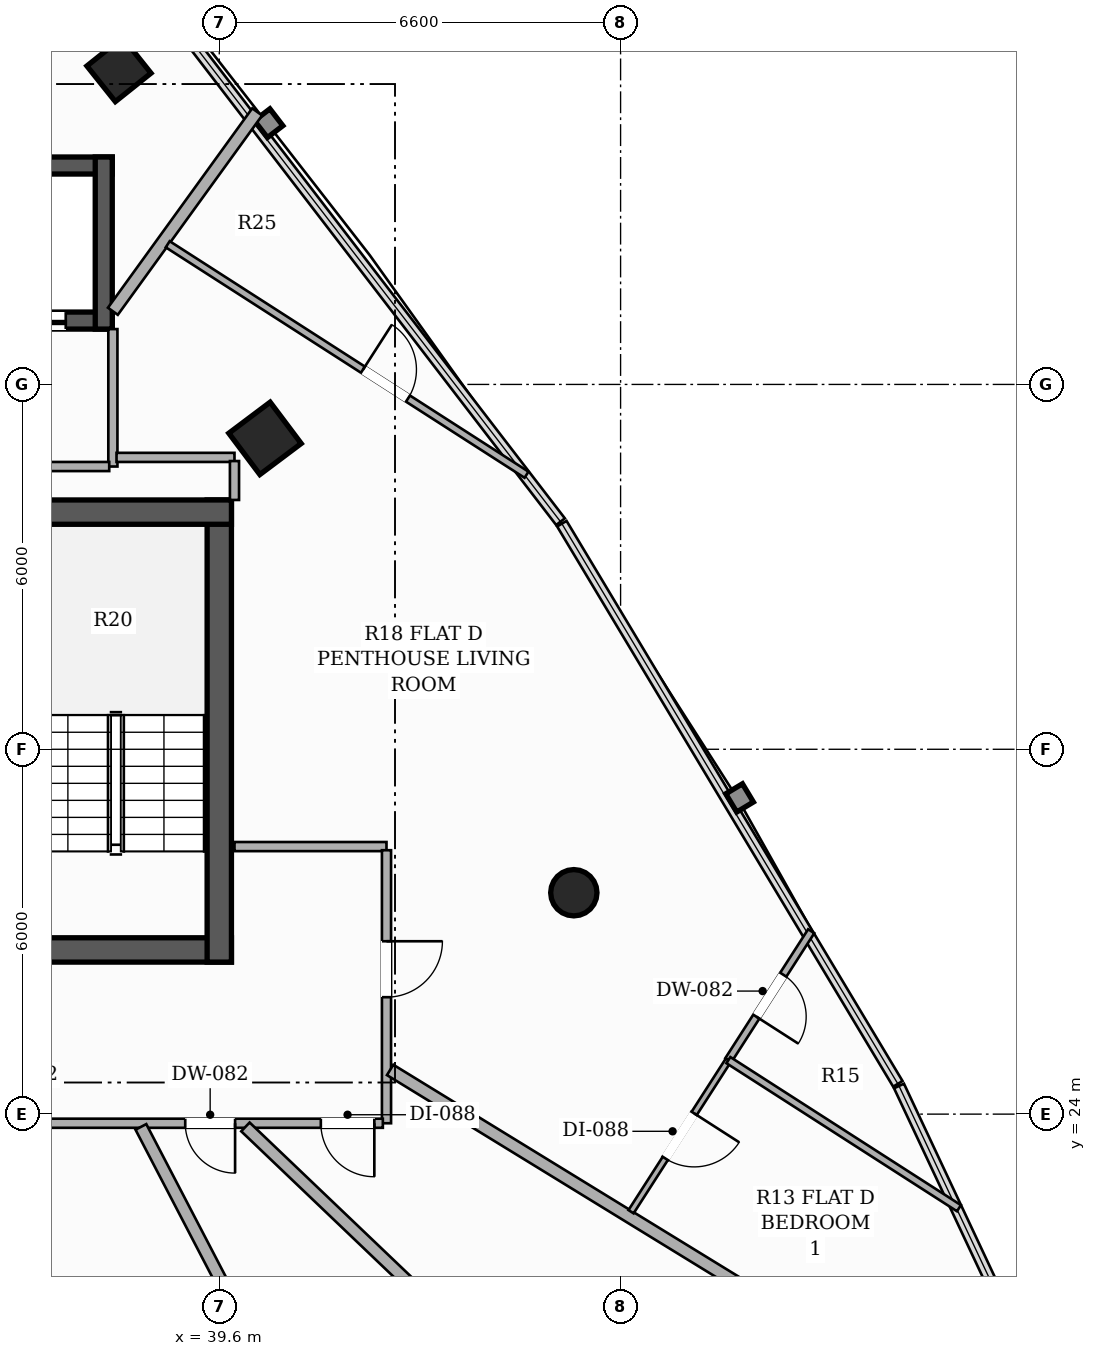
"""IFC4 building model, lengths in metres.
Left out: names, types, materials, properties, quantities, classifications, styles, units other than length and angle.
Written with IfcOpenShell. Run it as: python <this file> out.ifc"""

import sys

from ifc_helpers import new_model, si_unit, direction, frame, frame_2d, origin, origin_2d, place, context, subcontext, project, spatial, rectangle, hollow_rectangle, hollow_circle, extrude, element, fill, save


model = new_model("IFC4")
c1 = context("Model", 3, precision=1e-05, world=origin(), true_north=direction((0.0, 1.0)))
c2 = subcontext(c1, "Body", "Model", "MODEL_VIEW")
j1 = project(units=[si_unit("LENGTHUNIT", "METRE"), si_unit("PLANEANGLEUNIT", "RADIAN")], contexts=[c1])
p1 = place(None, origin())
s1 = spatial("IfcSite", under=j1, at=p1, CompositionType="ELEMENT")
p2 = place(p1, origin())
s2 = spatial("IfcBuilding", under=s1, at=p2, CompositionType="ELEMENT")
p3 = place(p2, frame((0.0, 0.0, 177.05)))
s3 = spatial("IfcBuildingStorey", under=s2, at=p3, CompositionType="ELEMENT", Elevation=177.05)
p4 = place(p3, frame((26.2, 26.7, 0.0), z_axis=(0.0, 0.0, 1.0), x_axis=(1.0, 0.0, 0.0)))
e1 = element("IfcWall", 1, at=p4, inside=s3, PredefinedType="SHEAR", context=c2, shape_type="SweptSolid", body=[
    extrude(rectangle(XDim=13.6, YDim=0.4, at=frame_2d((6.8, 0.0))), origin(), (0.0, 0.0, 1.0), 3.3),
])
p5 = place(p4, frame((4.35, 0.0, 0.0)))
e2 = element("IfcOpeningElement", 2, at=p5, cuts=e1, PredefinedType="OPENING", context=c2, shape_type="SweptSolid", body=[
    extrude(rectangle(XDim=1.05, YDim=2.15, at=frame_2d((0.525, 1.075))), frame((0.0, 0.21, 0.0), z_axis=(0.0, -1.0, 0.0), x_axis=(1.0, 0.0, 0.0)), (0.0, 0.0, 1.0), 0.42),
])
p6 = place(p4, frame((8.3, 0.0, 0.0)))
e3 = element("IfcOpeningElement", 3, at=p6, cuts=e1, PredefinedType="OPENING", context=c2, shape_type="SweptSolid", body=[
    extrude(rectangle(XDim=1.05, YDim=2.15, at=frame_2d((0.525, 1.075))), frame((0.0, 0.21, 0.0), z_axis=(0.0, -1.0, 0.0), x_axis=(1.0, 0.0, 0.0)), (0.0, 0.0, 1.0), 0.42),
])
p7 = place(p3, frame((39.6, 26.5, 0.0), z_axis=(0.0, 0.0, 1.0), x_axis=(0.0, 1.0, 0.0)))
e4 = element("IfcWall", 4, at=p7, inside=s3, PredefinedType="SHEAR", context=c2, shape_type="SweptSolid", body=[
    extrude(rectangle(XDim=7.6, YDim=0.4, at=frame_2d((3.8, 0.0))), origin(), (0.0, 0.0, 1.0), 3.3),
])
p8 = place(p3, frame((36.12, 33.9, 0.0), z_axis=(0.0, 0.0, 1.0), x_axis=(1.0, 0.0, 0.0)))
e5 = element("IfcWall", 5, at=p8, inside=s3, PredefinedType="SHEAR", context=c2, shape_type="SweptSolid", body=[
    extrude(rectangle(XDim=3.68, YDim=0.4, at=frame_2d((1.84, 0.0))), origin(), (0.0, 0.0, 1.0), 3.3),
])
p9 = place(p3, frame((37.84, 37.05, 0.0), z_axis=(0.0, 0.0, 1.0), x_axis=(-1.0, 0.0, 0.0)))
e6 = element("IfcWall", 6, at=p9, inside=s3, PredefinedType="SHEAR", context=c2, shape_type="SweptSolid", body=[
    extrude(rectangle(XDim=9.68, YDim=0.28, at=frame_2d((4.84, 0.0))), origin(), (0.0, 0.0, 1.0), 3.3),
])
p10 = place(p9, frame((7.815, 0.0, 0.0)))
e7 = element("IfcOpeningElement", 7, at=p10, cuts=e6, PredefinedType="OPENING", context=c2, shape_type="SweptSolid", body=[
    extrude(rectangle(XDim=1.1, YDim=2.2, at=frame_2d((0.55, 1.1))), frame((0.0, 0.15, 0.0), z_axis=(0.0, -1.0, 0.0), x_axis=(1.0, 0.0, 0.0)), (0.0, 0.0, 1.0), 0.3),
])
p11 = place(p9, frame((0.765, 0.0, 0.0)))
e8 = element("IfcOpeningElement", 8, at=p11, cuts=e6, PredefinedType="OPENING", context=c2, shape_type="SweptSolid", body=[
    extrude(rectangle(XDim=1.1, YDim=2.2, at=frame_2d((0.55, 1.1))), frame((0.0, 0.15, 0.0), z_axis=(0.0, -1.0, 0.0), x_axis=(1.0, 0.0, 0.0)), (0.0, 0.0, 1.0), 0.3),
])
p12 = place(p3, frame((28.16, 39.6, 0.0), z_axis=(0.0, 0.0, 1.0), x_axis=(1.0, 0.0, 0.0)))
e9 = element("IfcWall", 9, at=p12, inside=s3, PredefinedType="SHEAR", context=c2, shape_type="SweptSolid", body=[
    extrude(rectangle(XDim=9.68, YDim=0.28, at=frame_2d((4.84, 0.0))), origin(), (0.0, 0.0, 1.0), 3.3),
])
p13 = place(p3, frame((37.7, 36.91, 0.0), z_axis=(0.0, 0.0, 1.0), x_axis=(0.0, 1.0, 0.0)))
e10 = element("IfcWall", 10, at=p13, inside=s3, PredefinedType="SHEAR", context=c2, shape_type="SweptSolid", body=[
    extrude(rectangle(XDim=2.83, YDim=0.28, at=frame_2d((1.415, 0.0))), origin(), (0.0, 0.0, 1.0), 3.3),
])
p14 = place(p3, frame((45.431, 27.641, 0.0), z_axis=(0.0, 0.0, 1.0), x_axis=(1.0, 0.0, 0.0)))
e11 = element("IfcColumn", 11, at=p14, inside=s3, PredefinedType="COLUMN", context=c2, shape_type="SweptSolid", body=[
    extrude(hollow_circle(Radius=0.381, WallThickness=0.022, at=origin_2d()), origin(), (0.0, 0.0, 1.0), 3.3),
])
p15 = place(p3, frame((40.352, 35.113, 0.0), z_axis=(0.0, 0.0, 1.0), x_axis=(-0.600420225326, 0.799684658487, 0.0)))
e12 = element("IfcColumn", 12, at=p15, inside=s3, PredefinedType="COLUMN", context=c2, shape_type="SweptSolid", body=[
    extrude(hollow_rectangle(XDim=0.85, YDim=0.85, WallThickness=0.028, at=origin_2d()), origin(), (0.0, 0.0, 1.0), 3.3),
])
p16 = place(p3, frame((37.95, 41.178, 0.0), z_axis=(0.0, 0.0, 1.0), x_axis=(-0.623879596709, 0.781520472419, 0.0)))
e13 = element("IfcColumn", 13, at=p16, inside=s3, PredefinedType="COLUMN", context=c2, shape_type="SweptSolid", body=[
    extrude(hollow_rectangle(XDim=0.75, YDim=0.75, WallThickness=0.025, at=origin_2d()), origin(), (0.0, 0.0, 1.0), 3.3),
])
p17 = place(p3, frame((37.85, 34.65, 0.0), z_axis=(0.0, 0.0, 1.0), x_axis=(0.0, 1.0, 0.0)))
e14 = element("IfcWall", 14, at=p17, inside=s3, PredefinedType="PARTITIONING", context=c2, shape_type="SweptSolid", body=[
    extrude(rectangle(XDim=2.26, YDim=0.15, at=frame_2d((1.13, 0.0))), origin(), (0.0, 0.0, 1.0), 3.06),
])
p18 = place(p3, frame((36.385, 34.65, 0.0), z_axis=(0.0, 0.0, 1.0), x_axis=(1.0, 0.0, 0.0)))
e15 = element("IfcWall", 15, at=p18, inside=s3, PredefinedType="PARTITIONING", context=c2, shape_type="SweptSolid", body=[
    extrude(rectangle(XDim=1.405, YDim=0.15, at=frame_2d((0.703, 0.0))), origin(), (0.0, 0.0, 1.0), 2.425),
])
p19 = place(p3, frame((39.85, 28.4, 0.0), z_axis=(0.0, 0.0, 1.0), x_axis=(1.0, 0.0, 0.0)))
e16 = element("IfcWall", 16, at=p19, inside=s3, PredefinedType="PARTITIONING", context=c2, shape_type="SweptSolid", body=[
    extrude(rectangle(XDim=2.5, YDim=0.15, at=frame_2d((1.25, 0.0))), origin(), (0.0, 0.0, 1.0), 2.721),
])
p20 = place(p3, frame((42.35, 28.34, 0.0), z_axis=(0.0, 0.0, 1.0), x_axis=(0.0, -1.0, 0.0)))
e17 = element("IfcWall", 17, at=p20, inside=s3, PredefinedType="PARTITIONING", context=c2, shape_type="SweptSolid", body=[
    extrude(rectangle(XDim=4.49, YDim=0.15, at=frame_2d((2.245, 0.0))), origin(), (0.0, 0.0, 1.0), 2.721),
])
p21 = place(p20, frame((1.497, 0.0, 0.0)))
e18 = element("IfcOpeningElement", 18, at=p21, cuts=e17, PredefinedType="OPENING", context=c2, shape_type="SweptSolid", body=[
    extrude(rectangle(XDim=0.92, YDim=2.15, at=frame_2d((0.46, 1.075))), frame((0.0, 0.085, 0.0), z_axis=(0.0, -1.0, 0.0), x_axis=(1.0, 0.0, 0.0)), (0.0, 0.0, 1.0), 0.17),
])
p22 = place(p3, frame((42.29, 23.85, 0.0), z_axis=(0.0, 0.0, 1.0), x_axis=(-1.0, 0.0, 0.0)))
e19 = element("IfcWall", 19, at=p22, inside=s3, PredefinedType="PARTITIONING", context=c2, shape_type="SweptSolid", body=[
    extrude(rectangle(XDim=8.225, YDim=0.15, at=frame_2d((4.113, 0.0))), origin(), (0.0, 0.0, 1.0), 2.492),
])
p23 = place(p22, frame((5.493, 0.0, 0.0)))
e20 = element("IfcOpeningElement", 20, at=p23, cuts=e19, PredefinedType="OPENING", context=c2, shape_type="SweptSolid", body=[
    extrude(rectangle(XDim=0.92, YDim=2.15, at=frame_2d((0.46, 1.075))), frame((0.0, 0.085, 0.0), z_axis=(0.0, -1.0, 0.0), x_axis=(1.0, 0.0, 0.0)), (0.0, 0.0, 1.0), 0.17),
])
p24 = place(p22, frame((2.43, 0.0, 0.0)))
e21 = element("IfcOpeningElement", 21, at=p24, cuts=e19, PredefinedType="OPENING", context=c2, shape_type="SweptSolid", body=[
    extrude(rectangle(XDim=0.82, YDim=2.1, at=frame_2d((0.41, 1.05))), frame((0.0, 0.085, 0.0), z_axis=(0.0, -1.0, 0.0), x_axis=(1.0, 0.0, 0.0)), (0.0, 0.0, 1.0), 0.17),
])
p25 = place(p22, frame((0.14, 0.0, 0.0)))
e22 = element("IfcOpeningElement", 22, at=p25, cuts=e19, PredefinedType="OPENING", context=c2, shape_type="SweptSolid", body=[
    extrude(rectangle(XDim=0.88, YDim=2.1, at=frame_2d((0.44, 1.05))), frame((0.0, 0.085, 0.0), z_axis=(0.0, -1.0, 0.0), x_axis=(1.0, 0.0, 0.0)), (0.0, 0.0, 1.0), 0.17),
])
p26 = place(p3, frame((37.91, 34.8, 0.0), z_axis=(0.0, 0.0, 1.0), x_axis=(1.0, 0.0, 0.0)))
e23 = element("IfcWall", 23, at=p26, inside=s3, PredefinedType="PARTITIONING", context=c2, shape_type="SweptSolid", body=[
    extrude(rectangle(XDim=1.94, YDim=0.15, at=frame_2d((0.97, 0.0))), origin(), (0.0, 0.0, 1.0), 2.721),
])
p27 = place(p3, frame((39.85, 34.74, 0.0), z_axis=(0.0, 0.0, 1.0), x_axis=(0.0, -1.0, 0.0)))
e24 = element("IfcWall", 24, at=p27, inside=s3, PredefinedType="PARTITIONING", context=c2, shape_type="SweptSolid", body=[
    extrude(rectangle(XDim=0.64, YDim=0.15, at=frame_2d((0.32, 0.0))), origin(), (0.0, 0.0, 1.0), 2.721),
])
p28 = place(p3, frame((34.096, 23.79, 0.0), z_axis=(0.0, 0.0, 1.0), x_axis=(0.521886794995, -0.853014755564, 0.0)))
e25 = element("IfcWall", 25, at=p28, inside=s3, PredefinedType="PARTITIONING", context=c2, shape_type="SweptSolid", body=[
    extrude(rectangle(XDim=7.912, YDim=0.15, at=frame_2d((3.956, 0.0))), origin(), (0.0, 0.0, 1.0), 2.721),
])
p29 = place(p3, frame((38.311, 23.79, 0.0), z_axis=(0.0, 0.0, 1.0), x_axis=(0.461923729454, -0.886919651472, 0.0)))
e26 = element("IfcWall", 26, at=p29, inside=s3, PredefinedType="PARTITIONING", context=c2, shape_type="SweptSolid", body=[
    extrude(rectangle(XDim=21.335, YDim=0.2, at=frame_2d((10.667, 0.0))), origin(), (0.0, 0.0, 1.0), 2.413),
])
p30 = place(p3, frame((37.85, 37.203, 0.0), z_axis=(0.0, 0.0, 1.0), x_axis=(0.586236886407, 0.810139687348, 0.0)))
e27 = element("IfcWall", 27, at=p30, inside=s3, PredefinedType="PARTITIONING", context=c2, shape_type="SweptSolid", body=[
    extrude(rectangle(XDim=4.048, YDim=0.2, at=frame_2d((2.024, 0.0))), origin(), (0.0, 0.0, 1.0), 2.413),
])
p31 = place(p3, frame((54.079, 17.567, 0.0), z_axis=(0.0, 0.0, 1.0), x_axis=(-0.852338446262, 0.5229906051, 0.0)))
e28 = element("IfcWall", 28, at=p31, inside=s3, PredefinedType="PARTITIONING", context=c2, shape_type="SweptSolid", body=[
    extrude(rectangle(XDim=13.691, YDim=0.2, at=frame_2d((6.845, 0.0))), origin(), (0.0, 0.0, 1.0), 2.413),
])
p32 = place(p3, frame((40.03, 23.79, 0.0), z_axis=(0.0, 0.0, 1.0), x_axis=(0.723360866179, -0.690470171174, 0.0)))
e29 = element("IfcWall", 29, at=p32, inside=s3, PredefinedType="PARTITIONING", context=c2, shape_type="SweptSolid", body=[
    extrude(rectangle(XDim=23.953, YDim=0.2, at=frame_2d((11.977, 0.0))), origin(), (0.0, 0.0, 1.0), 2.413),
])
p33 = place(p3, frame((49.335, 27.008, 0.0), z_axis=(0.0, 0.0, 1.0), x_axis=(-0.540512736599, -0.841335831624, 0.0)))
e30 = element("IfcWall", 30, at=p33, inside=s3, PredefinedType="PARTITIONING", context=c2, shape_type="SweptSolid", body=[
    extrude(rectangle(XDim=2.52, YDim=0.12, at=frame_2d((1.26, 0.0))), origin(), (0.0, 0.0, 1.0), 3.06),
])
p34 = place(p33, frame((0.85, 0.0, 0.0)))
e31 = element("IfcOpeningElement", 31, at=p34, cuts=e30, PredefinedType="OPENING", context=c2, shape_type="SweptSolid", body=[
    extrude(rectangle(XDim=0.82, YDim=2.1, at=frame_2d((0.41, 1.05))), frame((0.0, 0.07, 0.0), z_axis=(0.0, -1.0, 0.0), x_axis=(1.0, 0.0, 0.0)), (0.0, 0.0, 1.0), 0.14),
])
p35 = place(p3, frame((38.752, 38.305, 0.0), z_axis=(0.0, 0.0, 1.0), x_axis=(0.84140799898, -0.54040038791, 0.0)))
e32 = element("IfcWall", 32, at=p35, inside=s3, PredefinedType="PARTITIONING", context=c2, shape_type="SweptSolid", body=[
    extrude(rectangle(XDim=7.013, YDim=0.12, at=frame_2d((3.507, 0.0))), origin(), (0.0, 0.0, 1.0), 2.413),
])
p36 = place(p35, frame((3.816, 0.0, 0.0)))
e33 = element("IfcOpeningElement", 33, at=p36, cuts=e32, PredefinedType="OPENING", context=c2, shape_type="SweptSolid", body=[
    extrude(rectangle(XDim=0.88, YDim=2.1, at=frame_2d((0.44, 1.05))), frame((0.0, 0.07, 0.0), z_axis=(0.0, -1.0, 0.0), x_axis=(1.0, 0.0, 0.0)), (0.0, 0.0, 1.0), 0.14),
])
p37 = place(p3, frame((47.973, 24.888, 0.0), z_axis=(0.0, 0.0, 1.0), x_axis=(-0.54033686579, -0.841448793135, 0.0)))
e34 = element("IfcWall", 34, at=p37, inside=s3, PredefinedType="PARTITIONING", context=c2, shape_type="SweptSolid", body=[
    extrude(rectangle(XDim=2.963, YDim=0.1, at=frame_2d((1.481, 0.0))), origin(), (0.0, 0.0, 1.0), 2.413),
])
p38 = place(p37, frame((1.041, 0.0, 0.0)))
e35 = element("IfcOpeningElement", 35, at=p38, cuts=e34, PredefinedType="OPENING", context=c2, shape_type="SweptSolid", body=[
    extrude(rectangle(XDim=0.88, YDim=2.1, at=frame_2d((0.44, 1.05))), frame((0.0, 0.06, 0.0), z_axis=(0.0, -1.0, 0.0), x_axis=(1.0, 0.0, 0.0)), (0.0, 0.0, 1.0), 0.12),
])
p39 = place(p3, frame((51.765, 22.453, 0.0), z_axis=(0.0, 0.0, 1.0), x_axis=(-0.841445922542, 0.540341336044, 0.0)))
e36 = element("IfcWall", 36, at=p39, inside=s3, PredefinedType="PARTITIONING", context=c2, shape_type="SweptSolid", body=[
    extrude(rectangle(XDim=4.507, YDim=0.12, at=frame_2d((2.253, 0.0))), origin(), (0.0, 0.0, 1.0), 3.06),
])
p40 = place(p11, origin())
e37 = element("IfcDoor", 37, at=p40, inside=s3, OperationType="DOUBLE_DOOR_SLIDING", PredefinedType="DOOR", context=c2, shape_type="SweptSolid", body=[
    extrude(rectangle(XDim=1.1, YDim=2.2, at=frame_2d((0.55, 1.1))), frame((0.0, 0.025, 0.0), z_axis=(0.0, -1.0, 0.0), x_axis=(1.0, 0.0, 0.0)), (0.0, 0.0, 1.0), 0.05),
])
fill(e8, e37)
p41 = place(p21, origin())
e38 = element("IfcDoor", 38, at=p41, inside=s3, OperationType="SINGLE_SWING_LEFT", PredefinedType="DOOR", context=c2, shape_type="SweptSolid", body=[
    extrude(rectangle(XDim=0.92, YDim=2.15, at=frame_2d((0.46, 1.075))), frame((0.0, 0.025, 0.0), z_axis=(0.0, -1.0, 0.0), x_axis=(1.0, 0.0, 0.0)), (0.0, 0.0, 1.0), 0.05),
])
fill(e18, e38)
p42 = place(p34, origin())
e39 = element("IfcDoor", 39, at=p42, inside=s3, OperationType="SINGLE_SWING_RIGHT", PredefinedType="DOOR", context=c2, shape_type="SweptSolid", body=[
    extrude(rectangle(XDim=0.82, YDim=2.1, at=frame_2d((0.41, 1.05))), frame((0.0, 0.025, 0.0), z_axis=(0.0, -1.0, 0.0), x_axis=(1.0, 0.0, 0.0)), (0.0, 0.0, 1.0), 0.05),
])
fill(e31, e39)
p43 = place(p36, origin())
e40 = element("IfcDoor", 40, at=p43, inside=s3, OperationType="SINGLE_SWING_LEFT", PredefinedType="DOOR", context=c2, shape_type="SweptSolid", body=[
    extrude(rectangle(XDim=0.88, YDim=2.1, at=frame_2d((0.44, 1.05))), frame((0.0, 0.025, 0.0), z_axis=(0.0, -1.0, 0.0), x_axis=(1.0, 0.0, 0.0)), (0.0, 0.0, 1.0), 0.05),
])
fill(e33, e40)
p44 = place(p38, origin())
e41 = element("IfcDoor", 41, at=p44, inside=s3, OperationType="SINGLE_SWING_LEFT", PredefinedType="DOOR", context=c2, shape_type="SweptSolid", body=[
    extrude(rectangle(XDim=0.88, YDim=2.1, at=frame_2d((0.44, 1.05))), frame((0.0, 0.025, 0.0), z_axis=(0.0, -1.0, 0.0), x_axis=(1.0, 0.0, 0.0)), (0.0, 0.0, 1.0), 0.05),
])
fill(e35, e41)
p45 = place(p24, origin())
e42 = element("IfcDoor", 42, at=p45, inside=s3, OperationType="SINGLE_SWING_LEFT", PredefinedType="DOOR", context=c2, shape_type="SweptSolid", body=[
    extrude(rectangle(XDim=0.82, YDim=2.1, at=frame_2d((0.41, 1.05))), frame((0.0, 0.025, 0.0), z_axis=(0.0, -1.0, 0.0), x_axis=(1.0, 0.0, 0.0)), (0.0, 0.0, 1.0), 0.05),
])
fill(e21, e42)
p46 = place(p25, origin())
e43 = element("IfcDoor", 43, at=p46, inside=s3, OperationType="SINGLE_SWING_LEFT", PredefinedType="DOOR", context=c2, shape_type="SweptSolid", body=[
    extrude(rectangle(XDim=0.88, YDim=2.1, at=frame_2d((0.44, 1.05))), frame((0.0, 0.025, 0.0), z_axis=(0.0, -1.0, 0.0), x_axis=(1.0, 0.0, 0.0)), (0.0, 0.0, 1.0), 0.05),
])
fill(e22, e43)
save(model, sys.argv[1])
